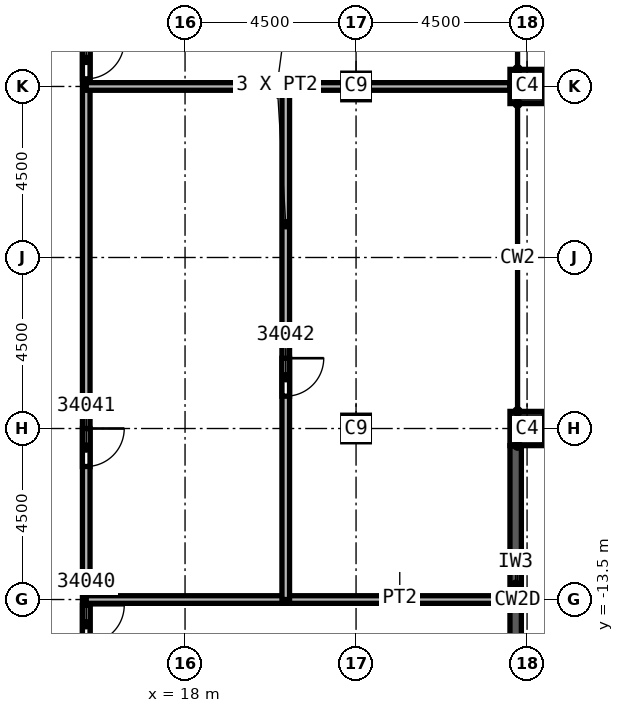
"""IFC4 building model, lengths in metres.
Left out: names, types, materials, properties, quantities, classifications, styles, units other than length and angle.
Written with IfcOpenShell. Run it as: python <this file> out.ifc"""

import sys

from ifc_helpers import new_model, si_unit, direction, frame, frame_2d, origin, origin_2d, place, context, subcontext, project, spatial, polyline, rectangle, outline, extrude, element, fill, save


model = new_model("IFC4")
c1 = context("Model", 3, precision=1e-05, world=origin(), true_north=direction((0.0, 1.0)))
c2 = subcontext(c1, "Body", "Model", "MODEL_VIEW")
j1 = project(units=[si_unit("LENGTHUNIT", "METRE"), si_unit("PLANEANGLEUNIT", "RADIAN")], contexts=[c1])
p1 = place(None, origin())
s1 = spatial("IfcSite", under=j1, at=p1, CompositionType="ELEMENT")
p2 = place(p1, origin())
s2 = spatial("IfcBuilding", under=s1, at=p2, CompositionType="ELEMENT")
p3 = place(p2, frame((0.0, 0.0, 366.0)))
s3 = spatial("IfcBuildingStorey", under=s2, at=p3, CompositionType="ELEMENT", Elevation=366.0)
for number, where, z_axis, x_axis in (
    (1, (22.5, 0.0, 0.0), (0.0, 0.0, 1.0), (1.0, 0.0, 0.0)),
    (2, (22.5, -9.0, 0.0), (0.0, 0.0, 1.0), (1.0, 0.0, 0.0)),
):
    element("IfcColumn", number, at=place(p3, frame(where, z_axis=z_axis, x_axis=x_axis)), inside=s3, PredefinedType="COLUMN", context=c2, shape_type="SweptSolid", body=[
        extrude(rectangle(XDim=0.7, YDim=0.7, at=origin_2d()), origin(), (0.0, 0.0, 1.0), 9.6),
    ])
for number, where, z_axis, x_axis in (
    (3, (27.0, 0.0, 0.0), (0.0, 0.0, 1.0), (0.0, 1.0, 0.0)),
    (4, (27.0, -9.0, 0.0), (0.0, 0.0, 1.0), (0.0, 1.0, 0.0)),
):
    element("IfcColumn", number, at=place(p3, frame(where, z_axis=z_axis, x_axis=x_axis)), inside=s3, PredefinedType="COLUMN", context=c2, shape_type="SweptSolid", body=[
        extrude(rectangle(XDim=0.9, YDim=0.9, at=origin_2d()), origin(), (0.0, 0.0, 1.0), 9.6),
    ])
p4 = place(p3, frame((26.7, -17.55, 10.246), z_axis=(0.0, 0.0, 1.0), x_axis=(0.0, 1.0, 0.0)))
e5 = element("IfcWall", 5, at=p4, inside=s3, PredefinedType="SOLIDWALL", context=c2, shape_type="SweptSolid", body=[
    extrude(outline(polyline([(0.0, 0.0), (8.1, 0.0), (8.1, 3.728), (0.0, 0.05), (0.0, 0.0)])), frame((0.0, 0.15, 0.0), z_axis=(0.0, -1.0, 0.0), x_axis=(1.0, 0.0, 0.0)), (0.0, 0.0, 1.0), 0.3),
])
p5 = place(p3, frame((15.4, 27.636, 0.0), z_axis=(0.0, 0.0, 1.0), x_axis=(0.0, -1.0, 0.0)))
e6 = element("IfcWall", 6, at=p5, inside=s3, PredefinedType="PARTITIONING", context=c2, shape_type="SweptSolid", body=[
    extrude(rectangle(XDim=55.086, YDim=0.2, at=frame_2d((27.543, 0.0))), origin(), (0.0, 0.0, 1.0), 5.76),
])
p6 = place(p5, frame((26.436, 0.0, 0.0)))
e7 = element("IfcOpeningElement", 7, at=p6, cuts=e6, PredefinedType="OPENING", context=c2, shape_type="SweptSolid", body=[
    extrude(rectangle(XDim=1.0, YDim=2.1, at=frame_2d((0.5, 1.05))), frame((0.0, 0.1, 0.0), z_axis=(0.0, -1.0, 0.0), x_axis=(1.0, 0.0, 0.0)), (0.0, 0.0, 1.0), 0.2),
])
p7 = place(p5, frame((21.936, 0.0, 0.0)))
e8 = element("IfcOpeningElement", 8, at=p7, cuts=e6, PredefinedType="OPENING", context=c2, shape_type="SweptSolid", body=[
    extrude(rectangle(XDim=1.0, YDim=2.1, at=frame_2d((0.5, 1.05))), frame((0.0, 0.1, 0.0), z_axis=(0.0, -1.0, 0.0), x_axis=(1.0, 0.0, 0.0)), (0.0, 0.0, 1.0), 0.2),
])
p8 = place(p5, frame((9.7, 0.0, 0.0)))
e9 = element("IfcOpeningElement", 9, at=p8, cuts=e6, PredefinedType="OPENING", context=c2, shape_type="SweptSolid", body=[
    extrude(rectangle(XDim=1.0, YDim=2.1, at=frame_2d((0.5, 1.05))), frame((0.0, 0.1, 0.0), z_axis=(0.0, -1.0, 0.0), x_axis=(1.0, 0.0, 0.0)), (0.0, 0.0, 1.0), 0.2),
])
p9 = place(p5, frame((49.986, 0.0, 0.0)))
e10 = element("IfcOpeningElement", 10, at=p9, cuts=e6, PredefinedType="OPENING", context=c2, shape_type="SweptSolid", body=[
    extrude(rectangle(XDim=1.0, YDim=2.1, at=frame_2d((0.5, 1.05))), frame((0.0, 0.1, 0.0), z_axis=(0.0, -1.0, 0.0), x_axis=(1.0, 0.0, 0.0)), (0.0, 0.0, 1.0), 0.2),
])
p10 = place(p5, frame((44.661, 0.0, 0.0)))
e11 = element("IfcOpeningElement", 11, at=p10, cuts=e6, PredefinedType="OPENING", context=c2, shape_type="SweptSolid", body=[
    extrude(rectangle(XDim=1.0, YDim=2.1, at=frame_2d((0.5, 1.05))), frame((0.0, 0.1, 0.0), z_axis=(0.0, -1.0, 0.0), x_axis=(1.0, 0.0, 0.0)), (0.0, 0.0, 1.0), 0.2),
])
p11 = place(p5, frame((41.286, 0.0, 0.0)))
e12 = element("IfcOpeningElement", 12, at=p11, cuts=e6, PredefinedType="OPENING", context=c2, shape_type="SweptSolid", body=[
    extrude(rectangle(XDim=1.0, YDim=2.1, at=frame_2d((0.5, 1.05))), frame((0.0, 0.1, 0.0), z_axis=(0.0, -1.0, 0.0), x_axis=(1.0, 0.0, 0.0)), (0.0, 0.0, 1.0), 0.2),
])
p12 = place(p5, frame((36.636, 0.0, 0.0)))
e13 = element("IfcOpeningElement", 13, at=p12, cuts=e6, PredefinedType="OPENING", context=c2, shape_type="SweptSolid", body=[
    extrude(rectangle(XDim=1.0, YDim=2.1, at=frame_2d((0.5, 1.05))), frame((0.0, 0.1, 0.0), z_axis=(0.0, -1.0, 0.0), x_axis=(1.0, 0.0, 0.0)), (0.0, 0.0, 1.0), 0.2),
])
p13 = place(p3, frame((15.4, -13.5, 0.0), z_axis=(0.0, 0.0, 1.0), x_axis=(1.0, 0.0, 0.0)))
e14 = element("IfcWall", 14, at=p13, inside=s3, PredefinedType="PARTITIONING", context=c2, shape_type="SweptSolid", body=[
    extrude(rectangle(XDim=11.15, YDim=0.2, at=frame_2d((5.575, 0.0))), origin(), (0.0, 0.0, 1.0), 9.15),
])
p14 = place(p3, frame((20.65, 0.0, 0.0), z_axis=(0.0, 0.0, 1.0), x_axis=(0.0, -1.0, 0.0)))
e15 = element("IfcWall", 15, at=p14, inside=s3, PredefinedType="PARTITIONING", context=c2, shape_type="SweptSolid", body=[
    extrude(rectangle(XDim=13.5, YDim=0.2, at=frame_2d((6.75, 0.0))), origin(), (0.0, 0.0, 1.0), 9.15),
])
p15 = place(p14, frame((7.15, 0.0, 0.0)))
e16 = element("IfcOpeningElement", 16, at=p15, cuts=e15, PredefinedType="OPENING", context=c2, shape_type="SweptSolid", body=[
    extrude(rectangle(XDim=1.0, YDim=2.1, at=frame_2d((0.5, 1.05))), frame((0.0, 0.1, 0.0), z_axis=(0.0, -1.0, 0.0), x_axis=(1.0, 0.0, 0.0)), (0.0, 0.0, 1.0), 0.2),
])
p16 = place(p3, frame((26.55, 0.0, 0.0), z_axis=(0.0, 0.0, 1.0), x_axis=(-1.0, 0.0, 0.0)))
e17 = element("IfcWall", 17, at=p16, inside=s3, PredefinedType="PARTITIONING", context=c2, shape_type="SweptSolid", body=[
    extrude(rectangle(XDim=11.15, YDim=0.2, at=frame_2d((5.575, 0.0))), origin(), (0.0, 0.0, 1.0), 9.15),
])
p17 = place(p6, origin())
e18 = element("IfcDoor", 18, at=p17, inside=s3, OperationType="SINGLE_SWING_LEFT", PredefinedType="DOOR", context=c2, shape_type="SweptSolid", body=[
    extrude(rectangle(XDim=1.0, YDim=2.1, at=frame_2d((0.5, 1.05))), frame((0.0, 0.025, 0.0), z_axis=(0.0, -1.0, 0.0), x_axis=(1.0, 0.0, 0.0)), (0.0, 0.0, 1.0), 0.05),
])
fill(e7, e18)
p18 = place(p11, origin())
e19 = element("IfcDoor", 19, at=p18, inside=s3, OperationType="SINGLE_SWING_LEFT", PredefinedType="DOOR", context=c2, shape_type="SweptSolid", body=[
    extrude(rectangle(XDim=1.0, YDim=2.1, at=frame_2d((0.5, 1.05))), frame((0.0, 0.025, 0.0), z_axis=(0.0, -1.0, 0.0), x_axis=(1.0, 0.0, 0.0)), (0.0, 0.0, 1.0), 0.05),
])
fill(e12, e19)
p19 = place(p12, origin())
e20 = element("IfcDoor", 20, at=p19, inside=s3, OperationType="SINGLE_SWING_RIGHT", PredefinedType="DOOR", context=c2, shape_type="SweptSolid", body=[
    extrude(rectangle(XDim=1.0, YDim=2.1, at=frame_2d((0.5, 1.05))), frame((0.0, 0.025, 0.0), z_axis=(0.0, -1.0, 0.0), x_axis=(1.0, 0.0, 0.0)), (0.0, 0.0, 1.0), 0.05),
])
fill(e13, e20)
p20 = place(p15, origin())
e21 = element("IfcDoor", 21, at=p20, inside=s3, OperationType="SINGLE_SWING_LEFT", PredefinedType="DOOR", context=c2, shape_type="SweptSolid", body=[
    extrude(rectangle(XDim=1.0, YDim=2.1, at=frame_2d((0.5, 1.05))), frame((0.0, 0.025, 0.0), z_axis=(0.0, -1.0, 0.0), x_axis=(1.0, 0.0, 0.0)), (0.0, 0.0, 1.0), 0.05),
])
fill(e16, e21)
save(model, sys.argv[1])
